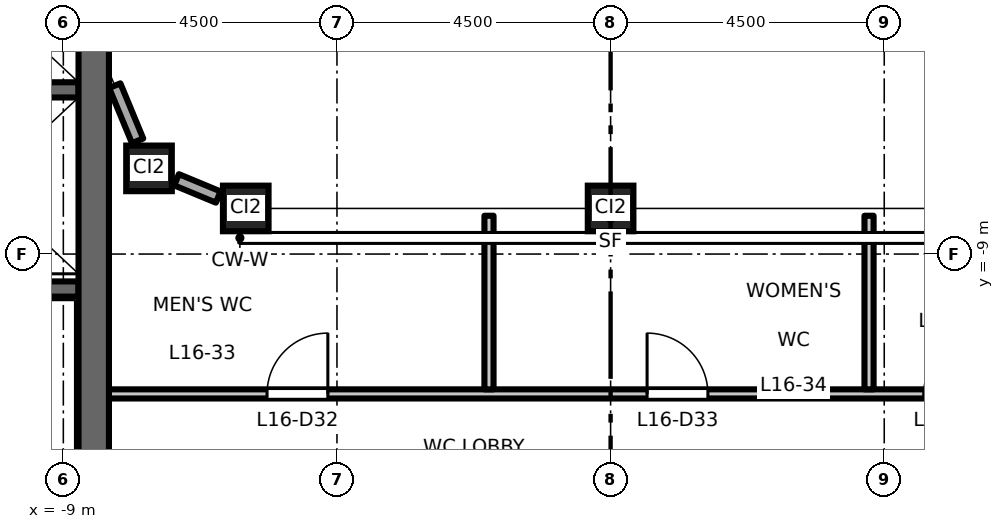
"""IFC4 building model, lengths in metres.
Left out: names, types, materials, properties, quantities, classifications, styles, units other than length and angle.
Written with IfcOpenShell. Run it as: python <this file> out.ifc"""

import sys

from ifc_helpers import new_model, si_unit, direction, frame, frame_2d, origin, origin_2d, place, context, subcontext, project, spatial, rectangle, hollow_rectangle, extrude, element, fill, save


model = new_model("IFC4")
c1 = context("Model", 3, precision=1e-05, world=origin(), true_north=direction((0.0, 1.0)))
c2 = subcontext(c1, "Body", "Model", "MODEL_VIEW")
j1 = project(units=[si_unit("LENGTHUNIT", "METRE"), si_unit("PLANEANGLEUNIT", "RADIAN")], contexts=[c1])
p1 = place(None, origin())
s1 = spatial("IfcSite", under=j1, at=p1, CompositionType="ELEMENT")
p2 = place(p1, origin())
s2 = spatial("IfcBuilding", under=s1, at=p2, CompositionType="ELEMENT")
p3 = place(p2, frame((0.0, 0.0, 76.2)))
s3 = spatial("IfcBuildingStorey", under=s2, at=p3, CompositionType="ELEMENT", Elevation=76.2)
for number, where, z_axis, x_axis in (
    (1, (-7.591, -7.591, 0.0), (0.0, 0.0, 1.0), (1.0, 0.0, 0.0)),
    (2, (-6.0, -8.25, 0.0), (0.0, 0.0, 1.0), (1.0, 0.0, 0.0)),
    (3, (0.0, -8.25, 0.0), (0.0, 0.0, 1.0), (1.0, 0.0, 0.0)),
):
    element("IfcColumn", number, at=place(p3, frame(where, z_axis=z_axis, x_axis=x_axis)), inside=s3, PredefinedType="COLUMN", context=c2, shape_type="SweptSolid", body=[
        extrude(hollow_rectangle(XDim=0.75, YDim=0.75, WallThickness=0.045, at=origin_2d()), origin(), (0.0, 0.0, 1.0), 4.5),
    ])
p4 = place(p3, frame((-8.75, -6.3, 0.0), z_axis=(0.0, 0.0, 1.0), x_axis=(-1.0, 0.0, 0.0)))
e4 = element("IfcWall", 4, at=p4, inside=s3, PredefinedType="SHEAR", context=c2, shape_type="SweptSolid", body=[
    extrude(rectangle(XDim=3.1, YDim=0.25, at=frame_2d((1.55, 0.0))), origin(), (0.0, 0.0, 1.0), 4.35),
])
p5 = place(p3, frame((-8.75, -9.575, 0.0), z_axis=(0.0, 0.0, 1.0), x_axis=(-1.0, 0.0, 0.0)))
e5 = element("IfcWall", 5, at=p5, inside=s3, PredefinedType="SHEAR", context=c2, shape_type="SweptSolid", body=[
    extrude(rectangle(XDim=8.0, YDim=0.25, at=frame_2d((4.0, 0.0))), origin(), (0.0, 0.0, 1.0), 4.35),
])
p6 = place(p5, frame((6.65, 0.0, 0.0)))
e6 = element("IfcOpeningElement", 6, at=p6, cuts=e5, PredefinedType="OPENING", context=c2, shape_type="SweptSolid", body=[
    extrude(rectangle(XDim=1.1, YDim=2.1, at=frame_2d((0.55, 1.05))), frame((0.0, 0.135, 0.0), z_axis=(0.0, -1.0, 0.0), x_axis=(1.0, 0.0, 0.0)), (0.0, 0.0, 1.0), 0.27),
])
p7 = place(p3, frame((-8.5, -13.0, 0.0), z_axis=(0.0, 0.0, 1.0), x_axis=(0.0, 1.0, 0.0)))
e7 = element("IfcWall", 7, at=p7, inside=s3, PredefinedType="SHEAR", context=c2, shape_type="SweptSolid", body=[
    extrude(rectangle(XDim=26.0, YDim=0.5, at=frame_2d((13.0, 0.0))), origin(), (0.0, 0.0, 1.0), 4.35),
])
p8 = place(p3, frame((-8.154, -6.231, 0.0), z_axis=(0.0, 0.0, 1.0), x_axis=(0.382549378284, -0.923935048136, 0.0)))
e8 = element("IfcWall", 8, at=p8, inside=s3, PredefinedType="STANDARD", context=c2, shape_type="SweptSolid", body=[
    extrude(rectangle(XDim=0.982, YDim=0.2, at=frame_2d((0.491, 0.0))), origin(), (0.0, 0.0, 1.0), 3.73),
])
p9 = place(p3, frame((-7.138, -7.779, 0.0), z_axis=(0.0, 0.0, 1.0), x_axis=(0.923940677943, -0.382535780864, 0.0)))
e9 = element("IfcWall", 9, at=p9, inside=s3, PredefinedType="STANDARD", context=c2, shape_type="SweptSolid", body=[
    extrude(rectangle(XDim=0.742, YDim=0.2, at=frame_2d((0.371, 0.0))), origin(), (0.0, 0.0, 1.0), 3.73),
])
p10 = place(p3, frame((-8.25, -11.3, 0.0), z_axis=(0.0, 0.0, 1.0), x_axis=(1.0, 0.0, 0.0)))
e10 = element("IfcWall", 10, at=p10, inside=s3, PredefinedType="PARTITIONING", context=c2, shape_type="SweptSolid", body=[
    extrude(rectangle(XDim=15.05, YDim=0.15, at=frame_2d((7.525, 0.0))), origin(), (0.0, 0.0, 1.0), 4.35),
])
p11 = place(p10, frame((2.6, 0.0, 0.0)))
e11 = element("IfcOpeningElement", 11, at=p11, cuts=e10, PredefinedType="OPENING", context=c2, shape_type="SweptSolid", body=[
    extrude(rectangle(XDim=1.0, YDim=2.1, at=frame_2d((0.5, 1.05))), frame((0.0, 0.085, 0.0), z_axis=(0.0, -1.0, 0.0), x_axis=(1.0, 0.0, 0.0)), (0.0, 0.0, 1.0), 0.17),
])
p12 = place(p10, frame((8.85, 0.0, 0.0)))
e12 = element("IfcOpeningElement", 12, at=p12, cuts=e10, PredefinedType="OPENING", context=c2, shape_type="SweptSolid", body=[
    extrude(rectangle(XDim=1.0, YDim=2.1, at=frame_2d((0.5, 1.05))), frame((0.0, 0.085, 0.0), z_axis=(0.0, -1.0, 0.0), x_axis=(1.0, 0.0, 0.0)), (0.0, 0.0, 1.0), 0.17),
])
p13 = place(p10, frame((13.4, 0.0, 0.0)))
e13 = element("IfcOpeningElement", 13, at=p13, cuts=e10, PredefinedType="OPENING", context=c2, shape_type="SweptSolid", body=[
    extrude(rectangle(XDim=1.0, YDim=2.1, at=frame_2d((0.5, 1.05))), frame((0.0, 0.085, 0.0), z_axis=(0.0, -1.0, 0.0), x_axis=(1.0, 0.0, 0.0)), (0.0, 0.0, 1.0), 0.17),
])
for number, where, z_axis, x_axis in (
    (14, (-2.0, -11.225, 0.0), (0.0, 0.0, 1.0), (0.0, 1.0, 0.0)),
    (15, (4.25, -11.225, 0.0), (0.0, 0.0, 1.0), (0.0, 1.0, 0.0)),
):
    element("IfcWall", number, at=place(p3, frame(where, z_axis=z_axis, x_axis=x_axis)), inside=s3, PredefinedType="PARTITIONING", context=c2, shape_type="SweptSolid", body=[
        extrude(rectangle(XDim=2.855, YDim=0.15, at=frame_2d((1.427, 0.0))), origin(), (0.0, 0.0, 1.0), 4.35),
    ])
p14 = place(p11, origin())
e16 = element("IfcDoor", 16, at=p14, inside=s3, OperationType="SINGLE_SWING_RIGHT", PredefinedType="DOOR", context=c2, shape_type="SweptSolid", body=[
    extrude(rectangle(XDim=1.0, YDim=2.1, at=frame_2d((0.5, 1.05))), frame((0.0, 0.025, 0.0), z_axis=(0.0, -1.0, 0.0), x_axis=(1.0, 0.0, 0.0)), (0.0, 0.0, 1.0), 0.05),
])
fill(e11, e16)
p15 = place(p12, origin())
e17 = element("IfcDoor", 17, at=p15, inside=s3, OperationType="SINGLE_SWING_LEFT", PredefinedType="DOOR", context=c2, shape_type="SweptSolid", body=[
    extrude(rectangle(XDim=1.0, YDim=2.1, at=frame_2d((0.5, 1.05))), frame((0.0, 0.025, 0.0), z_axis=(0.0, -1.0, 0.0), x_axis=(1.0, 0.0, 0.0)), (0.0, 0.0, 1.0), 0.05),
])
fill(e12, e17)
p16 = place(p13, origin())
e18 = element("IfcDoor", 18, at=p16, inside=s3, OperationType="SINGLE_SWING_RIGHT", PredefinedType="DOOR", context=c2, shape_type="SweptSolid", body=[
    extrude(rectangle(XDim=1.0, YDim=2.1, at=frame_2d((0.5, 1.05))), frame((0.0, 0.025, 0.0), z_axis=(0.0, -1.0, 0.0), x_axis=(1.0, 0.0, 0.0)), (0.0, 0.0, 1.0), 0.05),
])
fill(e13, e18)
save(model, sys.argv[1])
